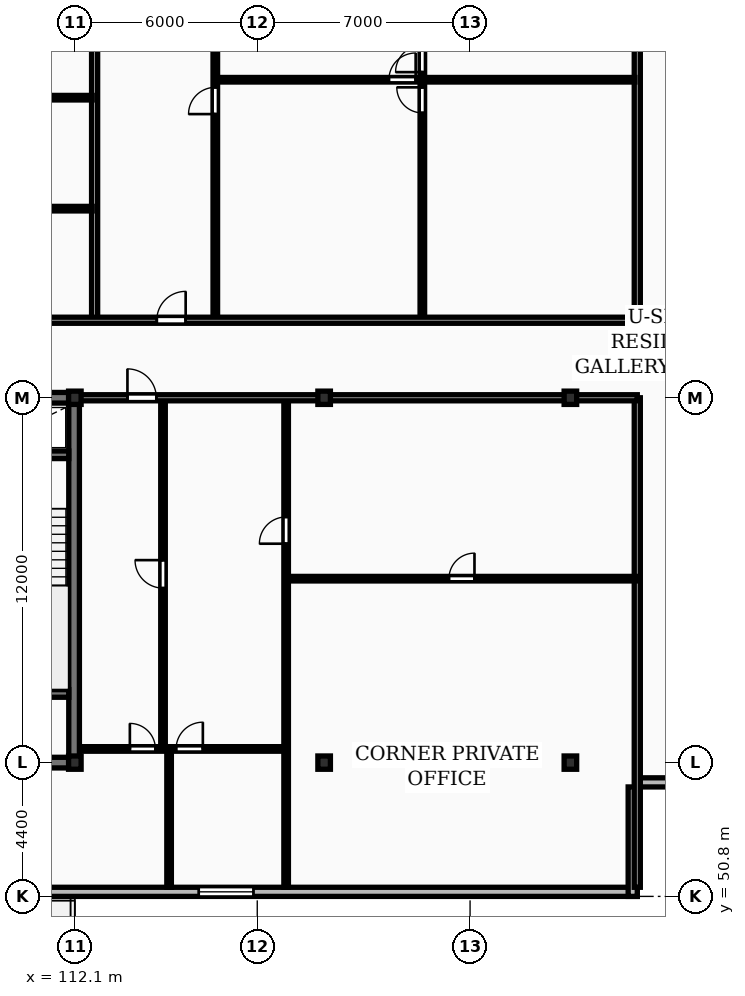
"""IFC4 building model, lengths in metres.
Left out: names, types, materials, properties, quantities, classifications, styles, units other than length and angle.
Written with IfcOpenShell. Run it as: python <this file> out.ifc"""

import sys

from ifc_helpers import new_model, si_unit, direction, frame, frame_2d, origin, origin_2d, place, context, subcontext, project, spatial, rectangle, i_section, extrude, element, fill, save


model = new_model("IFC4")
c1 = context("Model", 3, precision=1e-05, world=origin(), true_north=direction((0.0, 1.0)))
c2 = subcontext(c1, "Body", "Model", "MODEL_VIEW")
j1 = project(units=[si_unit("LENGTHUNIT", "METRE"), si_unit("PLANEANGLEUNIT", "RADIAN")], contexts=[c1])
p1 = place(None, origin())
s1 = spatial("IfcSite", under=j1, at=p1, CompositionType="ELEMENT")
p2 = place(p1, origin())
s2 = spatial("IfcBuilding", under=s1, at=p2, CompositionType="ELEMENT")
p3 = place(p2, frame((0.0, 0.0, 153.7)))
s3 = spatial("IfcBuildingStorey", under=s2, at=p3, CompositionType="ELEMENT", Elevation=153.7)
for number, where, z_axis, x_axis in (
    (1, (112.1, 55.2, 0.0), (0.0, 0.0, 1.0), (1.0, 0.0, 0.0)),
    (2, (112.1, 67.2, 0.0), (0.0, 0.0, 1.0), (1.0, 0.0, 0.0)),
    (3, (120.3, 55.2, 0.0), (0.0, 0.0, 1.0), (1.0, 0.0, 0.0)),
    (4, (120.3, 67.2, 0.0), (0.0, 0.0, 1.0), (1.0, 0.0, 0.0)),
    (5, (128.4, 55.2, 0.0), (0.0, 0.0, 1.0), (1.0, 0.0, 0.0)),
    (6, (128.4, 67.2, 0.0), (0.0, 0.0, 1.0), (1.0, 0.0, 0.0)),
):
    element("IfcColumn", number, at=place(p3, frame(where, z_axis=z_axis, x_axis=x_axis)), inside=s3, PredefinedType="COLUMN", context=c2, shape_type="SweptSolid", body=[
        extrude(i_section(OverallWidth=0.412, OverallDepth=0.437, WebThickness=0.036, FlangeThickness=0.052, FilletRadius=0.015, at=origin_2d()), origin(), (0.0, 0.0, 1.0), 3.6),
    ])
p4 = place(p3, frame((57.6, 50.95, 0.0), z_axis=(0.0, 0.0, 1.0), x_axis=(1.0, 0.0, 0.0)))
e7 = element("IfcWall", 7, at=p4, inside=s3, PredefinedType="STANDARD", context=c2, shape_type="SweptSolid", body=[
    extrude(rectangle(XDim=73.0, YDim=0.3, at=frame_2d((36.5, 0.0))), origin(), (0.0, 0.0, 1.0), 3.32),
])
p5 = place(p4, frame((15.225, 0.0, 0.85)))
e8 = element("IfcOpeningElement", 8, at=p5, cuts=e7, PredefinedType="OPENING", context=c2, shape_type="SweptSolid", body=[
    extrude(rectangle(XDim=1.8, YDim=1.8, at=frame_2d((0.9, 0.9))), frame((0.0, 0.16, 0.0), z_axis=(0.0, -1.0, 0.0), x_axis=(1.0, 0.0, 0.0)), (0.0, 0.0, 1.0), 0.32),
])
p6 = place(p4, frame((58.575, 0.0, 0.85)))
e9 = element("IfcOpeningElement", 9, at=p6, cuts=e7, PredefinedType="OPENING", context=c2, shape_type="SweptSolid", body=[
    extrude(rectangle(XDim=1.8, YDim=1.8, at=frame_2d((0.9, 0.9))), frame((0.0, 0.16, 0.0), z_axis=(0.0, -1.0, 0.0), x_axis=(1.0, 0.0, 0.0)), (0.0, 0.0, 1.0), 0.32),
])
p7 = place(p4, frame((33.45, 0.0, 0.0)))
e10 = element("IfcOpeningElement", 10, at=p7, cuts=e7, PredefinedType="OPENING", context=c2, shape_type="SweptSolid", body=[
    extrude(rectangle(XDim=1.1, YDim=2.1, at=frame_2d((0.55, 1.05))), frame((0.0, 0.16, 0.0), z_axis=(0.0, -1.0, 0.0), x_axis=(1.0, 0.0, 0.0)), (0.0, 0.0, 1.0), 0.32),
])
for number, where, z_axis, x_axis in (
    (11, (130.45, 50.8, 0.0), (0.0, 0.0, 1.0), (0.0, 1.0, 0.0)),
    (12, (130.6, 54.55, 0.0), (0.0, 0.0, 1.0), (1.0, 0.0, 0.0)),
):
    element("IfcWall", number, at=place(p3, frame(where, z_axis=z_axis, x_axis=x_axis)), inside=s3, PredefinedType="STANDARD", context=c2, shape_type="SweptSolid", body=[
        extrude(rectangle(XDim=3.6, YDim=0.3, at=frame_2d((1.8, 0.0))), origin(), (0.0, 0.0, 1.0), 3.32),
    ])
p8 = place(p3, frame((75.95, 55.2, 0.0), z_axis=(0.0, 0.0, 1.0), x_axis=(1.0, 0.0, 0.0)))
e13 = element("IfcWall", 13, at=p8, inside=s3, PredefinedType="SHEAR", context=c2, shape_type="SweptSolid", body=[
    extrude(rectangle(XDim=36.3, YDim=0.35, at=frame_2d((18.15, 0.0))), origin(), (0.0, 0.0, 1.0), 3.6),
])
p9 = place(p8, frame((15.1, 0.0, 0.0)))
e14 = element("IfcOpeningElement", 14, at=p9, cuts=e13, PredefinedType="OPENING", context=c2, shape_type="SweptSolid", body=[
    extrude(rectangle(XDim=1.1, YDim=2.1, at=frame_2d((0.55, 1.05))), frame((0.0, 0.185, 0.0), z_axis=(0.0, -1.0, 0.0), x_axis=(1.0, 0.0, 0.0)), (0.0, 0.0, 1.0), 0.37),
])
p10 = place(p3, frame((112.075, 55.375, 0.0), z_axis=(0.0, 0.0, 1.0), x_axis=(0.0, 1.0, 0.0)))
e15 = element("IfcWall", 15, at=p10, inside=s3, PredefinedType="SHEAR", context=c2, shape_type="SweptSolid", body=[
    extrude(rectangle(XDim=11.65, YDim=0.35, at=frame_2d((5.825, 0.0))), origin(), (0.0, 0.0, 1.0), 3.6),
])
p11 = place(p3, frame((75.95, 67.2, 0.0), z_axis=(0.0, 0.0, 1.0), x_axis=(1.0, 0.0, 0.0)))
e16 = element("IfcWall", 16, at=p11, inside=s3, PredefinedType="SHEAR", context=c2, shape_type="SweptSolid", body=[
    extrude(rectangle(XDim=36.3, YDim=0.35, at=frame_2d((18.15, 0.0))), origin(), (0.0, 0.0, 1.0), 3.6),
])
p12 = place(p11, frame((5.25, 0.0, 0.0)))
e17 = element("IfcOpeningElement", 17, at=p12, cuts=e16, PredefinedType="OPENING", context=c2, shape_type="SweptSolid", body=[
    extrude(rectangle(XDim=1.0, YDim=2.15, at=frame_2d((0.5, 1.075))), frame((0.0, 0.185, 0.0), z_axis=(0.0, -1.0, 0.0), x_axis=(1.0, 0.0, 0.0)), (0.0, 0.0, 1.0), 0.37),
])
p13 = place(p11, frame((21.6, 0.0, 0.0)))
e18 = element("IfcOpeningElement", 18, at=p13, cuts=e16, PredefinedType="OPENING", context=c2, shape_type="SweptSolid", body=[
    extrude(rectangle(XDim=1.5, YDim=2.2, at=frame_2d((0.75, 1.1))), frame((0.0, 0.185, 0.0), z_axis=(0.0, -1.0, 0.0), x_axis=(1.0, 0.0, 0.0)), (0.0, 0.0, 1.0), 0.37),
])
p14 = place(p11, frame((30.45, 0.0, 0.0)))
e19 = element("IfcOpeningElement", 19, at=p14, cuts=e16, PredefinedType="OPENING", context=c2, shape_type="SweptSolid", body=[
    extrude(rectangle(XDim=1.0, YDim=2.15, at=frame_2d((0.5, 1.075))), frame((0.0, 0.185, 0.0), z_axis=(0.0, -1.0, 0.0), x_axis=(1.0, 0.0, 0.0)), (0.0, 0.0, 1.0), 0.37),
])
for number, where, z_axis, x_axis in (
    (20, (108.66, 57.475, 0.0), (0.0, 0.0, 1.0), (1.0, 0.0, 0.0)),
    (21, (108.66, 65.325, 0.0), (0.0, 0.0, 1.0), (1.0, 0.0, 0.0)),
):
    element("IfcWall", number, at=place(p3, frame(where, z_axis=z_axis, x_axis=x_axis)), inside=s3, PredefinedType="SHEAR", context=c2, shape_type="SweptSolid", body=[
        extrude(rectangle(XDim=3.24, YDim=0.25, at=frame_2d((1.62, 0.0))), origin(), (0.0, 0.0, 1.0), 3.6),
    ])
p15 = place(p3, frame((130.6, 51.1, 0.0), z_axis=(0.0, 0.0, 1.0), x_axis=(0.0, 1.0, 0.0)))
e22 = element("IfcWall", 22, at=p15, inside=s3, PredefinedType="PARTITIONING", context=c2, shape_type="SweptSolid", body=[
    extrude(rectangle(XDim=16.1, YDim=0.2, at=frame_2d((8.05, 0.0))), origin(), (0.0, 0.0, 1.0), 3.32),
])
p16 = place(p3, frame((119.05, 61.25, 0.0), z_axis=(0.0, 0.0, 1.0), x_axis=(1.0, 0.0, 0.0)))
e23 = element("IfcWall", 23, at=p16, inside=s3, PredefinedType="PARTITIONING", context=c2, shape_type="SweptSolid", body=[
    extrude(rectangle(XDim=11.55, YDim=0.15, at=frame_2d((5.775, 0.0))), origin(), (0.0, 0.0, 1.0), 3.32),
])
p17 = place(p16, frame((5.355, 0.0, 0.0)))
e24 = element("IfcOpeningElement", 24, at=p17, cuts=e23, PredefinedType="OPENING", context=c2, shape_type="SweptSolid", body=[
    extrude(rectangle(XDim=0.84, YDim=2.04, at=frame_2d((0.42, 1.02))), frame((0.0, 0.085, 0.0), z_axis=(0.0, -1.0, 0.0), x_axis=(1.0, 0.0, 0.0)), (0.0, 0.0, 1.0), 0.17),
])
p18 = place(p3, frame((119.05, 51.1, 0.0), z_axis=(0.0, 0.0, 1.0), x_axis=(0.0, 1.0, 0.0)))
e25 = element("IfcWall", 25, at=p18, inside=s3, PredefinedType="PARTITIONING", context=c2, shape_type="SweptSolid", body=[
    extrude(rectangle(XDim=16.05, YDim=0.15, at=frame_2d((8.025, 0.0))), origin(), (0.0, 0.0, 1.0), 3.32),
])
p19 = place(p18, frame((11.3, 0.0, 0.0)))
e26 = element("IfcOpeningElement", 26, at=p19, cuts=e25, PredefinedType="OPENING", context=c2, shape_type="SweptSolid", body=[
    extrude(rectangle(XDim=0.88, YDim=2.06, at=frame_2d((0.44, 1.03))), frame((0.0, 0.085, 0.0), z_axis=(0.0, -1.0, 0.0), x_axis=(1.0, 0.0, 0.0)), (0.0, 0.0, 1.0), 0.17),
])
p20 = place(p3, frame((115.0, 55.65, 0.0), z_axis=(0.0, 0.0, 1.0), x_axis=(0.0, 1.0, 0.0)))
e27 = element("IfcWall", 27, at=p20, inside=s3, PredefinedType="PARTITIONING", context=c2, shape_type="SweptSolid", body=[
    extrude(rectangle(XDim=11.5, YDim=0.15, at=frame_2d((5.75, 0.0))), origin(), (0.0, 0.0, 1.0), 3.32),
])
p21 = place(p20, frame((5.29, 0.0, 0.0)))
e28 = element("IfcOpeningElement", 28, at=p21, cuts=e27, PredefinedType="OPENING", context=c2, shape_type="SweptSolid", body=[
    extrude(rectangle(XDim=0.92, YDim=2.08, at=frame_2d((0.46, 1.04))), frame((0.0, 0.085, 0.0), z_axis=(0.0, -1.0, 0.0), x_axis=(1.0, 0.0, 0.0)), (0.0, 0.0, 1.0), 0.17),
])
p22 = place(p3, frame((115.2, 51.1, 0.0), z_axis=(0.0, 0.0, 1.0), x_axis=(0.0, 1.0, 0.0)))
e29 = element("IfcWall", 29, at=p22, inside=s3, PredefinedType="PARTITIONING", context=c2, shape_type="SweptSolid", body=[
    extrude(rectangle(XDim=4.55, YDim=0.15, at=frame_2d((2.275, 0.0))), origin(), (0.0, 0.0, 1.0), 3.32),
])
p23 = place(p3, frame((112.27, 55.65, 0.0), z_axis=(0.0, 0.0, 1.0), x_axis=(1.0, 0.0, 0.0)))
e30 = element("IfcWall", 30, at=p23, inside=s3, PredefinedType="PARTITIONING", context=c2, shape_type="SweptSolid", body=[
    extrude(rectangle(XDim=6.76, YDim=0.15, at=frame_2d((3.38, 0.0))), origin(), (0.0, 0.0, 1.0), 3.32),
])
p24 = place(p23, frame((1.64, 0.0, 0.0)))
e31 = element("IfcOpeningElement", 31, at=p24, cuts=e30, PredefinedType="OPENING", context=c2, shape_type="SweptSolid", body=[
    extrude(rectangle(XDim=0.84, YDim=2.04, at=frame_2d((0.42, 1.02))), frame((0.0, 0.085, 0.0), z_axis=(0.0, -1.0, 0.0), x_axis=(1.0, 0.0, 0.0)), (0.0, 0.0, 1.0), 0.17),
])
p25 = place(p23, frame((3.16, 0.0, 0.0)))
e32 = element("IfcOpeningElement", 32, at=p25, cuts=e30, PredefinedType="OPENING", context=c2, shape_type="SweptSolid", body=[
    extrude(rectangle(XDim=0.88, YDim=2.06, at=frame_2d((0.44, 1.03))), frame((0.0, 0.085, 0.0), z_axis=(0.0, -1.0, 0.0), x_axis=(1.0, 0.0, 0.0)), (0.0, 0.0, 1.0), 0.17),
])
p26 = place(p3, frame((112.25, 67.2, 0.0), z_axis=(0.0, 0.0, 1.0), x_axis=(1.0, 0.0, 0.0)))
e33 = element("IfcWall", 33, at=p26, inside=s3, PredefinedType="PARTITIONING", context=c2, shape_type="SweptSolid", body=[
    extrude(rectangle(XDim=18.35, YDim=0.2, at=frame_2d((9.175, 0.0))), origin(), (0.0, 0.0, 1.0), 2.783),
])
p27 = place(p26, frame((1.58, 0.0, 0.0)))
e34 = element("IfcOpeningElement", 34, at=p27, cuts=e33, PredefinedType="OPENING", context=c2, shape_type="SweptSolid", body=[
    extrude(rectangle(XDim=0.95, YDim=2.15, at=frame_2d((0.475, 1.075))), frame((0.0, 0.11, 0.0), z_axis=(0.0, -1.0, 0.0), x_axis=(1.0, 0.0, 0.0)), (0.0, 0.0, 1.0), 0.22),
])
for number, where, z_axis, x_axis in (
    (35, (130.6, 69.83, 0.0), (0.0, 0.0, 1.0), (0.0, 1.0, 0.0)),
    (36, (112.75, 69.83, 0.0), (0.0, 0.0, 1.0), (0.0, 1.0, 0.0)),
):
    element("IfcWall", number, at=place(p3, frame(where, z_axis=z_axis, x_axis=x_axis)), inside=s3, PredefinedType="PARTITIONING", context=c2, shape_type="SweptSolid", body=[
        extrude(rectangle(XDim=26.07, YDim=0.2, at=frame_2d((13.035, 0.0))), origin(), (0.0, 0.0, 1.0), 3.32),
    ])
for number, where, z_axis, x_axis in (
    (37, (109.31, 73.42, 0.0), (0.0, 0.0, 1.0), (1.0, 0.0, 0.0)),
    (38, (109.31, 77.07, 0.0), (0.0, 0.0, 1.0), (1.0, 0.0, 0.0)),
):
    element("IfcWall", number, at=place(p3, frame(where, z_axis=z_axis, x_axis=x_axis)), inside=s3, PredefinedType="PARTITIONING", context=c2, shape_type="SweptSolid", body=[
        extrude(rectangle(XDim=3.36, YDim=0.15, at=frame_2d((1.68, 0.0))), origin(), (0.0, 0.0, 1.0), 3.32),
    ])
p28 = place(p3, frame((123.53, 69.81, 0.0), z_axis=(0.0, 0.0, 1.0), x_axis=(0.0, 1.0, 0.0)))
e39 = element("IfcWall", 39, at=p28, inside=s3, PredefinedType="PARTITIONING", context=c2, shape_type="SweptSolid", body=[
    extrude(rectangle(XDim=15.7, YDim=0.15, at=frame_2d((7.85, 0.0))), origin(), (0.0, 0.0, 1.0), 3.32),
])
p29 = place(p28, frame((6.76, 0.0, 0.0)))
e40 = element("IfcOpeningElement", 40, at=p29, cuts=e39, PredefinedType="OPENING", context=c2, shape_type="SweptSolid", body=[
    extrude(rectangle(XDim=0.84, YDim=2.04, at=frame_2d((0.42, 1.02))), frame((0.0, 0.085, 0.0), z_axis=(0.0, -1.0, 0.0), x_axis=(1.0, 0.0, 0.0)), (0.0, 0.0, 1.0), 0.17),
])
p30 = place(p28, frame((8.1, 0.0, 0.0)))
e41 = element("IfcOpeningElement", 41, at=p30, cuts=e39, PredefinedType="OPENING", context=c2, shape_type="SweptSolid", body=[
    extrude(rectangle(XDim=0.88, YDim=2.06, at=frame_2d((0.44, 1.03))), frame((0.0, 0.085, 0.0), z_axis=(0.0, -1.0, 0.0), x_axis=(1.0, 0.0, 0.0)), (0.0, 0.0, 1.0), 0.17),
])
p31 = place(p3, frame((116.78, 77.66, 0.0), z_axis=(0.0, 0.0, 1.0), x_axis=(1.0, 0.0, 0.0)))
e42 = element("IfcWall", 42, at=p31, inside=s3, PredefinedType="PARTITIONING", context=c2, shape_type="SweptSolid", body=[
    extrude(rectangle(XDim=13.74, YDim=0.15, at=frame_2d((6.87, 0.0))), origin(), (0.0, 0.0, 1.0), 3.32),
])
p32 = place(p31, frame((5.65, 0.0, 0.0)))
e43 = element("IfcOpeningElement", 43, at=p32, cuts=e42, PredefinedType="OPENING", context=c2, shape_type="SweptSolid", body=[
    extrude(rectangle(XDim=0.88, YDim=2.06, at=frame_2d((0.44, 1.03))), frame((0.0, 0.085, 0.0), z_axis=(0.0, -1.0, 0.0), x_axis=(1.0, 0.0, 0.0)), (0.0, 0.0, 1.0), 0.17),
])
p33 = place(p3, frame((116.72, 69.81, 0.0), z_axis=(0.0, 0.0, 1.0), x_axis=(0.0, 1.0, 0.0)))
e44 = element("IfcWall", 44, at=p33, inside=s3, PredefinedType="PARTITIONING", context=c2, shape_type="SweptSolid", body=[
    extrude(rectangle(XDim=15.7, YDim=0.15, at=frame_2d((7.85, 0.0))), origin(), (0.0, 0.0, 1.0), 3.32),
])
p34 = place(p33, frame((6.72, 0.0, 0.0)))
e45 = element("IfcOpeningElement", 45, at=p34, cuts=e44, PredefinedType="OPENING", context=c2, shape_type="SweptSolid", body=[
    extrude(rectangle(XDim=0.88, YDim=2.06, at=frame_2d((0.44, 1.03))), frame((0.0, 0.085, 0.0), z_axis=(0.0, -1.0, 0.0), x_axis=(1.0, 0.0, 0.0)), (0.0, 0.0, 1.0), 0.17),
])
p35 = place(p3, frame((57.6, 69.75, 0.0), z_axis=(0.0, 0.0, 1.0), x_axis=(1.0, 0.0, 0.0)))
e46 = element("IfcWall", 46, at=p35, inside=s3, PredefinedType="PARTITIONING", context=c2, shape_type="SweptSolid", body=[
    extrude(rectangle(XDim=73.0, YDim=0.2, at=frame_2d((36.5, 0.0))), origin(), (0.0, 0.0, 1.0), 3.32),
])
p36 = place(p35, frame((7.416, 0.0, 0.0)))
e47 = element("IfcOpeningElement", 47, at=p36, cuts=e46, PredefinedType="OPENING", context=c2, shape_type="SweptSolid", body=[
    extrude(rectangle(XDim=1.22, YDim=2.18, at=frame_2d((0.61, 1.09))), frame((0.0, 0.11, 0.0), z_axis=(0.0, -1.0, 0.0), x_axis=(1.0, 0.0, 0.0)), (0.0, 0.0, 1.0), 0.22),
])
p37 = place(p35, frame((26.456, 0.0, 0.0)))
e48 = element("IfcOpeningElement", 48, at=p37, cuts=e46, PredefinedType="OPENING", context=c2, shape_type="SweptSolid", body=[
    extrude(rectangle(XDim=1.22, YDim=2.18, at=frame_2d((0.61, 1.09))), frame((0.0, 0.11, 0.0), z_axis=(0.0, -1.0, 0.0), x_axis=(1.0, 0.0, 0.0)), (0.0, 0.0, 1.0), 0.22),
])
p38 = place(p35, frame((44.81, 0.0, 0.0)))
e49 = element("IfcOpeningElement", 49, at=p38, cuts=e46, PredefinedType="OPENING", context=c2, shape_type="SweptSolid", body=[
    extrude(rectangle(XDim=1.22, YDim=2.18, at=frame_2d((0.61, 1.09))), frame((0.0, 0.11, 0.0), z_axis=(0.0, -1.0, 0.0), x_axis=(1.0, 0.0, 0.0)), (0.0, 0.0, 1.0), 0.22),
])
p39 = place(p35, frame((57.195, 0.0, 0.0)))
e50 = element("IfcOpeningElement", 50, at=p39, cuts=e46, PredefinedType="OPENING", context=c2, shape_type="SweptSolid", body=[
    extrude(rectangle(XDim=0.95, YDim=2.15, at=frame_2d((0.475, 1.075))), frame((0.0, 0.11, 0.0), z_axis=(0.0, -1.0, 0.0), x_axis=(1.0, 0.0, 0.0)), (0.0, 0.0, 1.0), 0.22),
])
p40 = place(p6, origin())
e51 = element("IfcWindow", 51, at=p40, inside=s3, PartitioningType="SINGLE_PANEL", PredefinedType="WINDOW", context=c2, shape_type="SweptSolid", body=[
    extrude(rectangle(XDim=1.8, YDim=1.8, at=frame_2d((0.9, 0.9))), frame((0.0, 0.03, 0.0), z_axis=(0.0, -1.0, 0.0), x_axis=(1.0, 0.0, 0.0)), (0.0, 0.0, 1.0), 0.06),
])
fill(e9, e51)
p41 = place(p17, origin())
e52 = element("IfcDoor", 52, at=p41, inside=s3, OperationType="SINGLE_SWING_RIGHT", PredefinedType="DOOR", context=c2, shape_type="SweptSolid", body=[
    extrude(rectangle(XDim=0.84, YDim=2.04, at=frame_2d((0.42, 1.02))), frame((0.0, 0.025, 0.0), z_axis=(0.0, -1.0, 0.0), x_axis=(1.0, 0.0, 0.0)), (0.0, 0.0, 1.0), 0.05),
])
fill(e24, e52)
p42 = place(p19, origin())
e53 = element("IfcDoor", 53, at=p42, inside=s3, OperationType="SINGLE_SWING_LEFT", PredefinedType="DOOR", context=c2, shape_type="SweptSolid", body=[
    extrude(rectangle(XDim=0.88, YDim=2.06, at=frame_2d((0.44, 1.03))), frame((0.0, 0.025, 0.0), z_axis=(0.0, -1.0, 0.0), x_axis=(1.0, 0.0, 0.0)), (0.0, 0.0, 1.0), 0.05),
])
fill(e26, e53)
p43 = place(p21, origin())
e54 = element("IfcDoor", 54, at=p43, inside=s3, OperationType="SINGLE_SWING_RIGHT", PredefinedType="DOOR", context=c2, shape_type="SweptSolid", body=[
    extrude(rectangle(XDim=0.92, YDim=2.08, at=frame_2d((0.46, 1.04))), frame((0.0, 0.025, 0.0), z_axis=(0.0, -1.0, 0.0), x_axis=(1.0, 0.0, 0.0)), (0.0, 0.0, 1.0), 0.05),
])
fill(e28, e54)
p44 = place(p24, origin())
e55 = element("IfcDoor", 55, at=p44, inside=s3, OperationType="SINGLE_SWING_LEFT", PredefinedType="DOOR", context=c2, shape_type="SweptSolid", body=[
    extrude(rectangle(XDim=0.84, YDim=2.04, at=frame_2d((0.42, 1.02))), frame((0.0, 0.025, 0.0), z_axis=(0.0, -1.0, 0.0), x_axis=(1.0, 0.0, 0.0)), (0.0, 0.0, 1.0), 0.05),
])
fill(e31, e55)
p45 = place(p25, origin())
e56 = element("IfcDoor", 56, at=p45, inside=s3, OperationType="SINGLE_SWING_RIGHT", PredefinedType="DOOR", context=c2, shape_type="SweptSolid", body=[
    extrude(rectangle(XDim=0.88, YDim=2.06, at=frame_2d((0.44, 1.03))), frame((0.0, 0.025, 0.0), z_axis=(0.0, -1.0, 0.0), x_axis=(1.0, 0.0, 0.0)), (0.0, 0.0, 1.0), 0.05),
])
fill(e32, e56)
p46 = place(p27, origin())
e57 = element("IfcDoor", 57, at=p46, inside=s3, OperationType="SINGLE_SWING_LEFT", PredefinedType="DOOR", context=c2, shape_type="SweptSolid", body=[
    extrude(rectangle(XDim=0.95, YDim=2.15, at=frame_2d((0.475, 1.075))), frame((0.0, 0.025, 0.0), z_axis=(0.0, -1.0, 0.0), x_axis=(1.0, 0.0, 0.0)), (0.0, 0.0, 1.0), 0.05),
])
fill(e34, e57)
p47 = place(p29, origin())
e58 = element("IfcDoor", 58, at=p47, inside=s3, OperationType="SINGLE_SWING_RIGHT", PredefinedType="DOOR", context=c2, shape_type="SweptSolid", body=[
    extrude(rectangle(XDim=0.84, YDim=2.04, at=frame_2d((0.42, 1.02))), frame((0.0, 0.025, 0.0), z_axis=(0.0, -1.0, 0.0), x_axis=(1.0, 0.0, 0.0)), (0.0, 0.0, 1.0), 0.05),
])
fill(e40, e58)
p48 = place(p30, origin())
e59 = element("IfcDoor", 59, at=p48, inside=s3, OperationType="SINGLE_SWING_LEFT", PredefinedType="DOOR", context=c2, shape_type="SweptSolid", body=[
    extrude(rectangle(XDim=0.88, YDim=2.06, at=frame_2d((0.44, 1.03))), frame((0.0, 0.025, 0.0), z_axis=(0.0, -1.0, 0.0), x_axis=(1.0, 0.0, 0.0)), (0.0, 0.0, 1.0), 0.05),
])
fill(e41, e59)
p49 = place(p32, origin())
e60 = element("IfcDoor", 60, at=p49, inside=s3, OperationType="SINGLE_SWING_RIGHT", PredefinedType="DOOR", context=c2, shape_type="SweptSolid", body=[
    extrude(rectangle(XDim=0.88, YDim=2.06, at=frame_2d((0.44, 1.03))), frame((0.0, 0.025, 0.0), z_axis=(0.0, -1.0, 0.0), x_axis=(1.0, 0.0, 0.0)), (0.0, 0.0, 1.0), 0.05),
])
fill(e43, e60)
p50 = place(p34, origin())
e61 = element("IfcDoor", 61, at=p50, inside=s3, OperationType="SINGLE_SWING_LEFT", PredefinedType="DOOR", context=c2, shape_type="SweptSolid", body=[
    extrude(rectangle(XDim=0.88, YDim=2.06, at=frame_2d((0.44, 1.03))), frame((0.0, 0.025, 0.0), z_axis=(0.0, -1.0, 0.0), x_axis=(1.0, 0.0, 0.0)), (0.0, 0.0, 1.0), 0.05),
])
fill(e45, e61)
p51 = place(p39, origin())
e62 = element("IfcDoor", 62, at=p51, inside=s3, OperationType="SINGLE_SWING_RIGHT", PredefinedType="DOOR", context=c2, shape_type="SweptSolid", body=[
    extrude(rectangle(XDim=0.95, YDim=2.15, at=frame_2d((0.475, 1.075))), frame((0.0, 0.025, 0.0), z_axis=(0.0, -1.0, 0.0), x_axis=(1.0, 0.0, 0.0)), (0.0, 0.0, 1.0), 0.05),
])
fill(e50, e62)
save(model, sys.argv[1])
